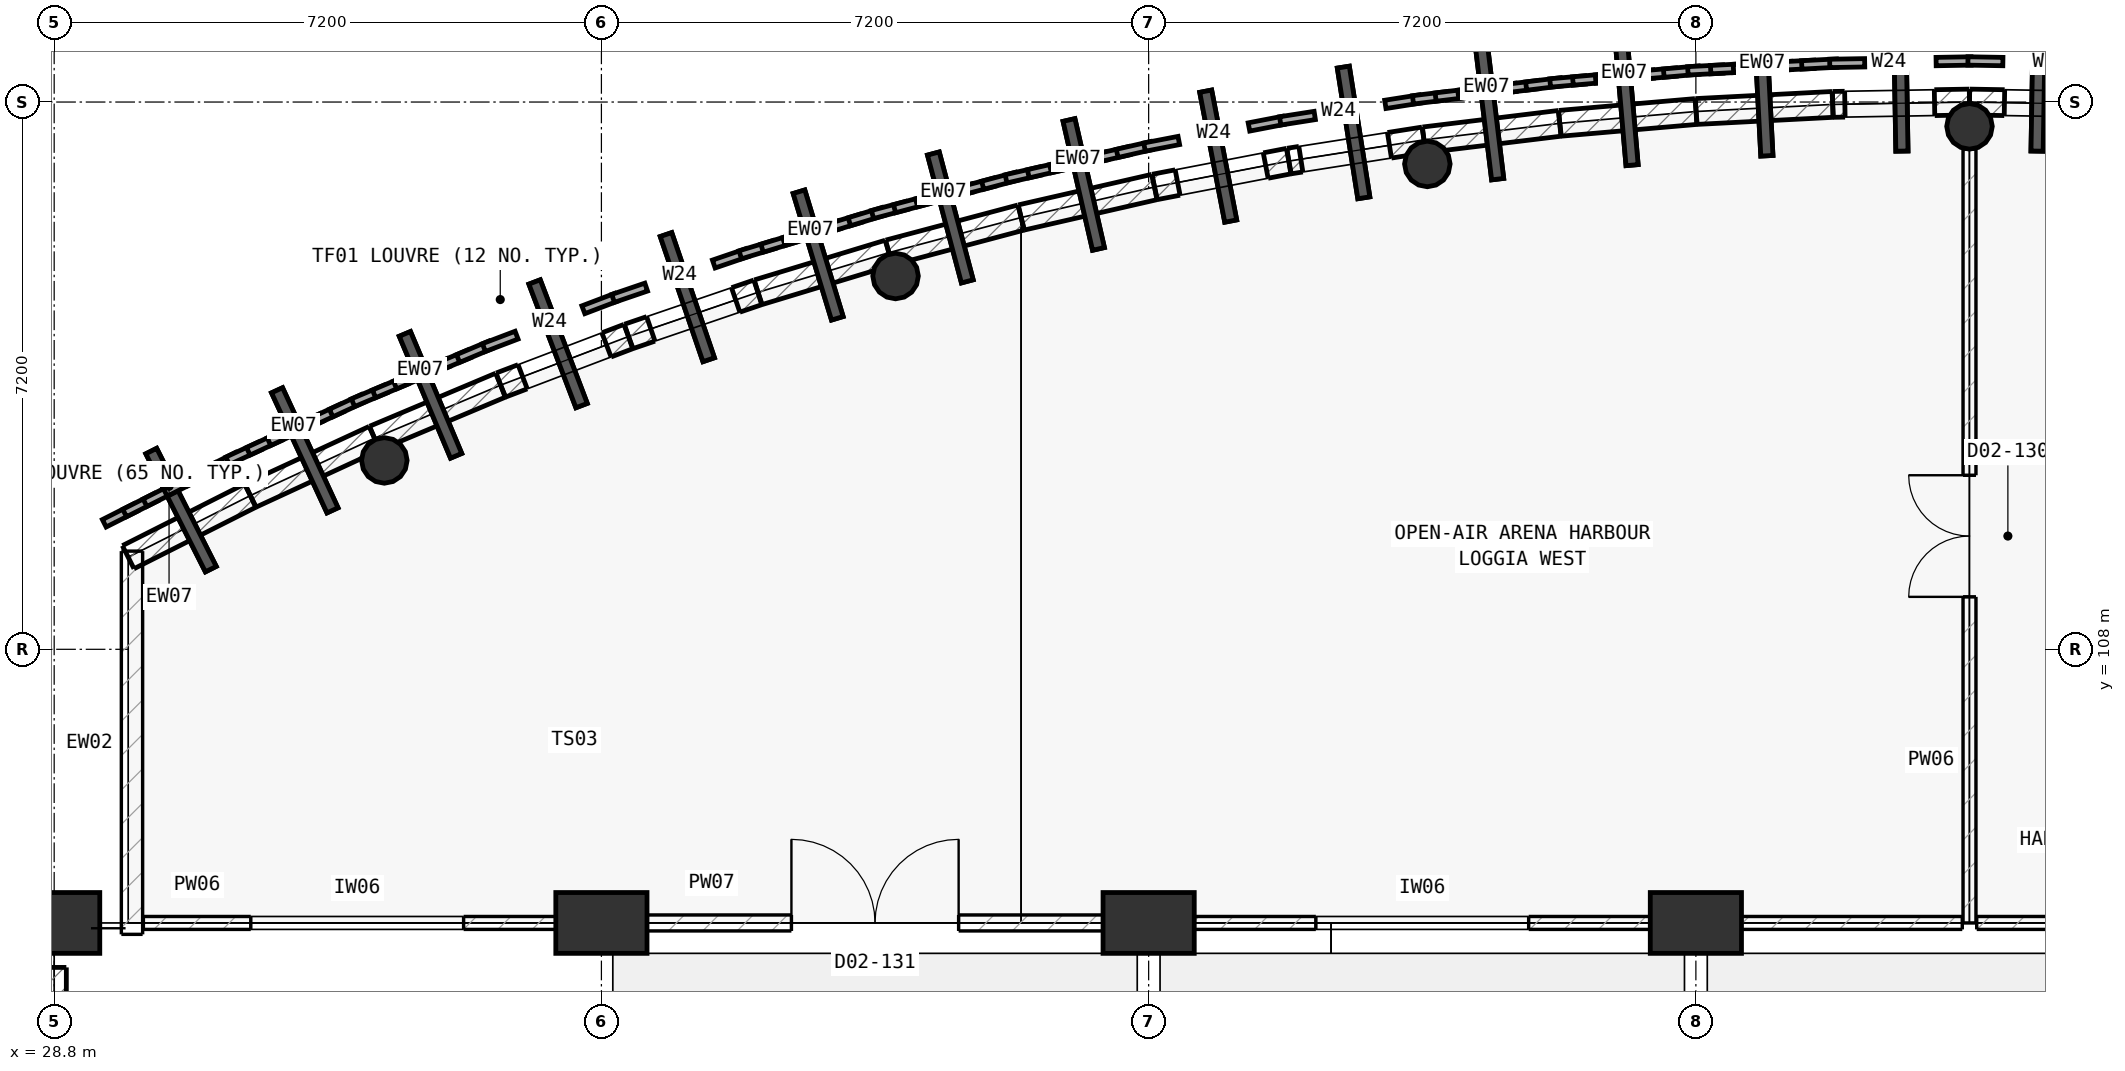
"""IFC4 building model, lengths in metres.
Left out: names, types, materials, properties, quantities, classifications, styles, units other than length and angle.
Written with IfcOpenShell. Run it as: python <this file> out.ifc"""

import sys

from ifc_helpers import new_model, si_unit, direction, frame, frame_2d, origin, origin_2d, place, context, subcontext, project, spatial, polyline, rectangle, circle, outline, extrude, element, fill, save


model = new_model("IFC4")
c1 = context("Model", 3, precision=1e-05, world=origin(), true_north=direction((0.0, 1.0)))
c2 = subcontext(c1, "Body", "Model", "MODEL_VIEW")
j1 = project(units=[si_unit("LENGTHUNIT", "METRE"), si_unit("PLANEANGLEUNIT", "RADIAN")], contexts=[c1])
p1 = place(None, origin())
s1 = spatial("IfcSite", under=j1, at=p1, CompositionType="ELEMENT")
p2 = place(p1, origin())
s2 = spatial("IfcBuilding", under=s1, at=p2, CompositionType="ELEMENT")
p3 = place(p2, frame((0.0, 0.0, 11.2)))
s3 = spatial("IfcBuildingStorey", under=s2, at=p3, CompositionType="ELEMENT", Elevation=11.2)
p4 = place(p3, frame((28.8, 104.4, -0.8), z_axis=(0.0, 0.0, 1.0), x_axis=(1.0, 0.0, 0.0)))
e1 = element("IfcColumn", 1, at=p4, inside=s3, PredefinedType="COLUMN", context=c2, shape_type="SweptSolid", body=[
    extrude(rectangle(XDim=0.8, YDim=1.2, at=origin_2d()), origin(), (0.0, 0.0, 1.0), 5.6),
])
p5 = place(p3, frame((33.144, 110.485, 0.0), z_axis=(0.0, 0.0, 1.0), x_axis=(1.0, 0.0, 0.0)))
e2 = element("IfcColumn", 2, at=p5, inside=s3, PredefinedType="COLUMN", context=c2, shape_type="SweptSolid", body=[
    extrude(circle(Radius=0.3, at=origin_2d()), origin(), (0.0, 0.0, 1.0), 4.8),
])
p6 = place(p3, frame((36.0, 104.4, -0.8), z_axis=(0.0, 0.0, 1.0), x_axis=(1.0, 0.0, 0.0)))
e3 = element("IfcColumn", 3, at=p6, inside=s3, PredefinedType="COLUMN", context=c2, shape_type="SweptSolid", body=[
    extrude(rectangle(XDim=0.8, YDim=1.2, at=origin_2d()), origin(), (0.0, 0.0, 1.0), 5.6),
])
p7 = place(p3, frame((39.87, 112.911, 0.0), z_axis=(0.0, 0.0, 1.0), x_axis=(1.0, 0.0, 0.0)))
e4 = element("IfcColumn", 4, at=p7, inside=s3, PredefinedType="COLUMN", context=c2, shape_type="SweptSolid", body=[
    extrude(circle(Radius=0.3, at=origin_2d()), origin(), (0.0, 0.0, 1.0), 4.8),
])
p8 = place(p3, frame((43.2, 104.4, -0.8), z_axis=(0.0, 0.0, 1.0), x_axis=(1.0, 0.0, 0.0)))
e5 = element("IfcColumn", 5, at=p8, inside=s3, PredefinedType="COLUMN", context=c2, shape_type="SweptSolid", body=[
    extrude(rectangle(XDim=0.8, YDim=1.2, at=origin_2d()), origin(), (0.0, 0.0, 1.0), 5.6),
])
p9 = place(p3, frame((46.867, 114.385, 0.0), z_axis=(0.0, 0.0, 1.0), x_axis=(1.0, 0.0, 0.0)))
e6 = element("IfcColumn", 6, at=p9, inside=s3, PredefinedType="COLUMN", context=c2, shape_type="SweptSolid", body=[
    extrude(circle(Radius=0.3, at=origin_2d()), origin(), (0.0, 0.0, 1.0), 4.8),
])
p10 = place(p3, frame((50.4, 104.4, -0.8), z_axis=(0.0, 0.0, 1.0), x_axis=(1.0, 0.0, 0.0)))
e7 = element("IfcColumn", 7, at=p10, inside=s3, PredefinedType="COLUMN", context=c2, shape_type="SweptSolid", body=[
    extrude(rectangle(XDim=0.8, YDim=1.2, at=origin_2d()), origin(), (0.0, 0.0, 1.0), 5.6),
])
p11 = place(p3, frame((54.0, 114.88, 0.0), z_axis=(0.0, 0.0, 1.0), x_axis=(1.0, 0.0, 0.0)))
e8 = element("IfcColumn", 8, at=p11, inside=s3, PredefinedType="COLUMN", context=c2, shape_type="SweptSolid", body=[
    extrude(circle(Radius=0.3, at=origin_2d()), origin(), (0.0, 0.0, 1.0), 4.8),
])
for number, where, z_axis, x_axis in (
    (9, (29.774, 109.212, 0.0), (0.0, 0.0, 1.0), (0.893, 0.45, 0.0)),
    (10, (31.381, 110.023, 0.0), (0.0, 0.0, 1.0), (0.908, 0.419, 0.0)),
):
    element("IfcWall", number, at=place(p3, frame(where, z_axis=z_axis, x_axis=x_axis)), inside=s3, PredefinedType="SOLIDWALL", context=c2, shape_type="SweptSolid", body=[
        extrude(outline(polyline([(0.003, -0.17), (1.797, -0.17), (1.803, 0.17), (-0.003, 0.17), (0.003, -0.17)])), origin(), (0.0, 0.0, 1.0), 4.8),
    ])
p12 = place(p3, frame((33.015, 110.778, 0.0), z_axis=(0.0, 0.0, 1.0), x_axis=(0.921803799964, 0.387656748131, 0.0)))
e11 = element("IfcWall", 11, at=p12, inside=s3, PredefinedType="SOLIDWALL", context=c2, shape_type="SweptSolid", body=[
    extrude(outline(polyline([(0.003, -0.17), (1.797, -0.17), (1.803, 0.17), (-0.003, 0.17), (0.003, -0.17)])), origin(), (0.0, 0.0, 1.0), 4.8),
])
p13 = place(p3, frame((34.674, 111.475, 0.0), z_axis=(0.0, 0.0, 1.0), x_axis=(0.934674543416, 0.35550456803, 0.0)))
e12 = element("IfcWall", 12, at=p13, inside=s3, PredefinedType="SOLIDWALL", context=c2, shape_type="SweptSolid", body=[
    extrude(outline(polyline([(0.003, -0.17), (1.797, -0.17), (1.803, 0.17), (-0.003, 0.17), (0.003, -0.17)])), origin(), (0.0, 0.0, 1.0), 4.8),
])
p14 = place(p13, frame((0.31, 0.0, 0.55)))
e13 = element("IfcOpeningElement", 13, at=p14, cuts=e12, PredefinedType="OPENING", context=c2, shape_type="SweptSolid", body=[
    extrude(rectangle(XDim=1.18, YDim=3.4, at=frame_2d((0.59, 1.7))), frame((0.0, 0.18, 0.0), z_axis=(0.0, -1.0, 0.0), x_axis=(1.0, 0.0, 0.0)), (0.0, 0.0, 1.0), 0.36),
])
p15 = place(p3, frame((36.356, 112.115, 0.0), z_axis=(0.0, 0.0, 1.0), x_axis=(0.946421657721, 0.322933500578, 0.0)))
e14 = element("IfcWall", 14, at=p15, inside=s3, PredefinedType="SOLIDWALL", context=c2, shape_type="SweptSolid", body=[
    extrude(outline(polyline([(0.003, -0.17), (1.797, -0.17), (1.803, 0.17), (-0.003, 0.17), (0.003, -0.17)])), origin(), (0.0, 0.0, 1.0), 4.8),
])
p16 = place(p15, frame((0.31, 0.0, 0.55)))
e15 = element("IfcOpeningElement", 15, at=p16, cuts=e14, PredefinedType="OPENING", context=c2, shape_type="SweptSolid", body=[
    extrude(rectangle(XDim=1.18, YDim=3.4, at=frame_2d((0.59, 1.7))), frame((0.0, 0.18, 0.0), z_axis=(0.0, -1.0, 0.0), x_axis=(1.0, 0.0, 0.0)), (0.0, 0.0, 1.0), 0.36),
])
p17 = place(p3, frame((38.06, 112.697, 0.0), z_axis=(0.0, 0.0, 1.0), x_axis=(0.956993600338, 0.290109029354, 0.0)))
e16 = element("IfcWall", 16, at=p17, inside=s3, PredefinedType="SOLIDWALL", context=c2, shape_type="SweptSolid", body=[
    extrude(outline(polyline([(0.003, -0.17), (1.797, -0.17), (1.803, 0.17), (-0.003, 0.17), (0.003, -0.17)])), origin(), (0.0, 0.0, 1.0), 4.8),
])
p18 = place(p3, frame((39.783, 113.219, 0.0), z_axis=(0.0, 0.0, 1.0), x_axis=(0.966504582235, 0.256649357135, 0.0)))
e17 = element("IfcWall", 17, at=p18, inside=s3, PredefinedType="SOLIDWALL", context=c2, shape_type="SweptSolid", body=[
    extrude(outline(polyline([(0.003, -0.17), (1.797, -0.17), (1.803, 0.17), (-0.003, 0.17), (0.003, -0.17)])), origin(), (0.0, 0.0, 1.0), 4.8),
])
p19 = place(p3, frame((41.522, 113.681, 0.0), z_axis=(0.0, 0.0, 1.0), x_axis=(0.974791962114, 0.223115733641, 0.0)))
e18 = element("IfcWall", 18, at=p19, inside=s3, PredefinedType="SOLIDWALL", context=c2, shape_type="SweptSolid", body=[
    extrude(outline(polyline([(0.003, -0.17), (1.797, -0.17), (1.803, 0.17), (-0.003, 0.17), (0.003, -0.17)])), origin(), (0.0, 0.0, 1.0), 4.8),
])
p20 = place(p3, frame((43.277, 114.082, 0.0), z_axis=(0.0, 0.0, 1.0), x_axis=(0.981913462005, 0.189330275271, 0.0)))
e19 = element("IfcWall", 19, at=p20, inside=s3, PredefinedType="SOLIDWALL", context=c2, shape_type="SweptSolid", body=[
    extrude(outline(polyline([(0.003, -0.17), (1.797, -0.17), (1.803, 0.17), (-0.003, 0.17), (0.003, -0.17)])), origin(), (0.0, 0.0, 1.0), 4.8),
])
p21 = place(p20, frame((0.31, 0.0, 0.55)))
e20 = element("IfcOpeningElement", 20, at=p21, cuts=e19, PredefinedType="OPENING", context=c2, shape_type="SweptSolid", body=[
    extrude(rectangle(XDim=1.18, YDim=3.4, at=frame_2d((0.59, 1.7))), frame((0.0, 0.18, 0.0), z_axis=(0.0, -1.0, 0.0), x_axis=(1.0, 0.0, 0.0)), (0.0, 0.0, 1.0), 0.36),
])
p22 = place(p3, frame((45.044, 114.423, 0.0), z_axis=(0.0, 0.0, 1.0), x_axis=(0.987886929918, 0.155175428783, 0.0)))
e21 = element("IfcWall", 21, at=p22, inside=s3, PredefinedType="SOLIDWALL", context=c2, shape_type="SweptSolid", body=[
    extrude(outline(polyline([(0.003, -0.17), (1.797, -0.17), (1.803, 0.17), (-0.003, 0.17), (0.003, -0.17)])), origin(), (0.0, 0.0, 1.0), 4.8),
])
p23 = place(p22, frame((0.16, 0.0, 0.55)))
e22 = element("IfcOpeningElement", 22, at=p23, cuts=e21, PredefinedType="OPENING", context=c2, shape_type="SweptSolid", body=[
    extrude(rectangle(XDim=1.18, YDim=3.4, at=frame_2d((0.59, 1.7))), frame((0.0, 0.18, 0.0), z_axis=(0.0, -1.0, 0.0), x_axis=(1.0, 0.0, 0.0)), (0.0, 0.0, 1.0), 0.36),
])
p24 = place(p3, frame((46.823, 114.702, 0.0), z_axis=(0.0, 0.0, 1.0), x_axis=(0.992671296073, 0.120845761006, 0.0)))
e23 = element("IfcWall", 23, at=p24, inside=s3, PredefinedType="SOLIDWALL", context=c2, shape_type="SweptSolid", body=[
    extrude(outline(polyline([(0.003, -0.17), (1.797, -0.17), (1.803, 0.17), (-0.003, 0.17), (0.003, -0.17)])), origin(), (0.0, 0.0, 1.0), 4.8),
])
p25 = place(p3, frame((48.609, 114.92, 0.0), z_axis=(0.0, 0.0, 1.0), x_axis=(0.996260411494, 0.086401345422, 0.0)))
e24 = element("IfcWall", 24, at=p25, inside=s3, PredefinedType="SOLIDWALL", context=c2, shape_type="SweptSolid", body=[
    extrude(outline(polyline([(0.003, -0.17), (1.797, -0.17), (1.803, 0.17), (-0.003, 0.17), (0.003, -0.17)])), origin(), (0.0, 0.0, 1.0), 4.8),
])
p26 = place(p3, frame((50.403, 115.075, 0.0), z_axis=(0.0, 0.0, 1.0), x_axis=(0.998649863362, 0.051946611119, 0.0)))
e25 = element("IfcWall", 25, at=p26, inside=s3, PredefinedType="SOLIDWALL", context=c2, shape_type="SweptSolid", body=[
    extrude(outline(polyline([(0.003, -0.17), (1.797, -0.17), (1.803, 0.17), (-0.003, 0.17), (0.003, -0.17)])), origin(), (0.0, 0.0, 1.0), 4.8),
])
p27 = place(p3, frame((52.2, 115.169, 0.0), z_axis=(0.0, 0.0, 1.0), x_axis=(0.999851642284, 0.017224790907, 0.0)))
e26 = element("IfcWall", 26, at=p27, inside=s3, PredefinedType="SOLIDWALL", context=c2, shape_type="SweptSolid", body=[
    extrude(outline(polyline([(0.003, -0.17), (1.797, -0.17), (1.803, 0.17), (-0.003, 0.17), (0.003, -0.17)])), origin(), (0.0, 0.0, 1.0), 4.8),
])
p28 = place(p27, frame((0.16, 0.0, 0.55)))
e27 = element("IfcOpeningElement", 27, at=p28, cuts=e26, PredefinedType="OPENING", context=c2, shape_type="SweptSolid", body=[
    extrude(rectangle(XDim=1.18, YDim=3.4, at=frame_2d((0.59, 1.7))), frame((0.0, 0.18, 0.0), z_axis=(0.0, -1.0, 0.0), x_axis=(1.0, 0.0, 0.0)), (0.0, 0.0, 1.0), 0.36),
])
p29 = place(p3, frame((54.0, 115.2, 0.0), z_axis=(0.0, 0.0, 1.0), x_axis=(0.999851642284, -0.017224790907, 0.0)))
e28 = element("IfcWall", 28, at=p29, inside=s3, PredefinedType="SOLIDWALL", context=c2, shape_type="SweptSolid", body=[
    extrude(outline(polyline([(0.003, -0.17), (1.797, -0.17), (1.803, 0.17), (-0.003, 0.17), (0.003, -0.17)])), origin(), (0.0, 0.0, 1.0), 4.8),
])
p30 = place(p29, frame((0.46, 0.0, 0.55)))
e29 = element("IfcOpeningElement", 29, at=p30, cuts=e28, PredefinedType="OPENING", context=c2, shape_type="SweptSolid", body=[
    extrude(rectangle(XDim=1.18, YDim=3.4, at=frame_2d((0.59, 1.7))), frame((0.0, 0.18, 0.0), z_axis=(0.0, -1.0, 0.0), x_axis=(1.0, 0.0, 0.0)), (0.0, 0.0, 1.0), 0.36),
])
p31 = place(p3, frame((29.824, 104.25, 0.0), z_axis=(0.0, 0.0, 1.0), x_axis=(0.0, 1.0, 0.0)))
e30 = element("IfcWall", 30, at=p31, inside=s3, PredefinedType="SOLIDWALL", context=c2, shape_type="SweptSolid", body=[
    extrude(rectangle(XDim=5.042, YDim=0.28, at=frame_2d((2.521, 0.0))), origin(), (0.0, 0.0, 1.0), 4.49),
])
p32 = place(p3, frame((28.8, 94.035, 0.0), z_axis=(0.0, 0.0, 1.0), x_axis=(0.0, 1.0, 0.0)))
e31 = element("IfcWall", 31, at=p32, inside=s3, PredefinedType="SOLIDWALL", context=c2, shape_type="SweptSolid", body=[
    extrude(rectangle(XDim=9.78, YDim=0.32, at=frame_2d((4.89, 0.0))), origin(), (0.0, 0.0, 1.0), 4.8),
])
p33 = place(p32, frame((3.29, 0.0, 2.15)))
e32 = element("IfcOpeningElement", 32, at=p33, cuts=e31, PredefinedType="OPENING", context=c2, shape_type="SweptSolid", body=[
    extrude(rectangle(XDim=3.2, YDim=1.2, at=frame_2d((1.6, 0.6))), frame((0.0, 0.17, 0.0), z_axis=(0.0, -1.0, 0.0), x_axis=(1.0, 0.0, 0.0)), (0.0, 0.0, 1.0), 0.34),
])
p34 = place(p3, frame((54.0, 104.4, 0.0), z_axis=(0.0, 0.0, 1.0), x_axis=(0.0, 1.0, 0.0)))
e33 = element("IfcWall", 33, at=p34, inside=s3, PredefinedType="PARTITIONING", context=c2, shape_type="SweptSolid", body=[
    extrude(rectangle(XDim=10.18, YDim=0.17, at=frame_2d((5.09, 0.0))), origin(), (0.0, 0.0, 1.0), 4.49),
])
p35 = place(p34, frame((4.29, 0.0, 0.0)))
e34 = element("IfcOpeningElement", 34, at=p35, cuts=e33, PredefinedType="OPENING", context=c2, shape_type="SweptSolid", body=[
    extrude(rectangle(XDim=1.6, YDim=2.2, at=frame_2d((0.8, 1.1))), frame((0.0, 0.095, 0.0), z_axis=(0.0, -1.0, 0.0), x_axis=(1.0, 0.0, 0.0)), (0.0, 0.0, 1.0), 0.19),
])
p36 = place(p3, frame((29.974, 104.4, 0.0), z_axis=(0.0, 0.0, 1.0), x_axis=(1.0, 0.0, 0.0)))
e35 = element("IfcWall", 35, at=p36, inside=s3, PredefinedType="PARTITIONING", context=c2, shape_type="SweptSolid", body=[
    extrude(rectangle(XDim=5.626, YDim=0.17, at=frame_2d((2.813, 0.0))), origin(), (0.0, 0.0, 1.0), 3.88),
])
p37 = place(p36, frame((1.413, 0.0, 0.95)))
e36 = element("IfcOpeningElement", 36, at=p37, cuts=e35, PredefinedType="OPENING", context=c2, shape_type="SweptSolid", body=[
    extrude(rectangle(XDim=2.8, YDim=1.9, at=frame_2d((1.4, 0.95))), frame((0.0, 0.095, 0.0), z_axis=(0.0, -1.0, 0.0), x_axis=(1.0, 0.0, 0.0)), (0.0, 0.0, 1.0), 0.19),
])
p38 = place(p3, frame((36.4, 104.4, 0.0), z_axis=(0.0, 0.0, 1.0), x_axis=(1.0, 0.0, 0.0)))
e37 = element("IfcWall", 37, at=p38, inside=s3, PredefinedType="PARTITIONING", context=c2, shape_type="SweptSolid", body=[
    extrude(rectangle(XDim=6.4, YDim=0.21, at=frame_2d((3.2, 0.0))), origin(), (0.0, 0.0, 1.0), 3.88),
])
p39 = place(p38, frame((2.1, 0.0, 0.0)))
e38 = element("IfcOpeningElement", 38, at=p39, cuts=e37, PredefinedType="OPENING", context=c2, shape_type="SweptSolid", body=[
    extrude(rectangle(XDim=2.2, YDim=2.5, at=frame_2d((1.1, 1.25))), frame((0.0, 0.115, 0.0), z_axis=(0.0, -1.0, 0.0), x_axis=(1.0, 0.0, 0.0)), (0.0, 0.0, 1.0), 0.23),
])
p40 = place(p3, frame((43.6, 104.4, 0.0), z_axis=(0.0, 0.0, 1.0), x_axis=(1.0, 0.0, 0.0)))
e39 = element("IfcWall", 39, at=p40, inside=s3, PredefinedType="PARTITIONING", context=c2, shape_type="SweptSolid", body=[
    extrude(rectangle(XDim=6.4, YDim=0.17, at=frame_2d((3.2, 0.0))), origin(), (0.0, 0.0, 1.0), 3.88),
])
p41 = place(p40, frame((1.8, 0.0, 0.95)))
e40 = element("IfcOpeningElement", 40, at=p41, cuts=e39, PredefinedType="OPENING", context=c2, shape_type="SweptSolid", body=[
    extrude(rectangle(XDim=2.8, YDim=1.9, at=frame_2d((1.4, 0.95))), frame((0.0, 0.095, 0.0), z_axis=(0.0, -1.0, 0.0), x_axis=(1.0, 0.0, 0.0)), (0.0, 0.0, 1.0), 0.19),
])
for number, where, z_axis, x_axis in (
    (41, (50.8, 104.4, 0.0), (0.0, 0.0, 1.0), (1.0, 0.0, 0.0)),
    (42, (54.095, 104.4, 0.0), (0.0, 0.0, 1.0), (1.0, 0.0, 0.0)),
):
    element("IfcWall", number, at=place(p3, frame(where, z_axis=z_axis, x_axis=x_axis)), inside=s3, PredefinedType="PARTITIONING", context=c2, shape_type="SweptSolid", body=[
        extrude(rectangle(XDim=3.105, YDim=0.17, at=frame_2d((1.552, 0.0))), origin(), (0.0, 0.0, 1.0), 3.88),
    ])
p42 = place(p14, origin())
e43 = element("IfcWindow", 43, at=p42, inside=s3, PartitioningType="SINGLE_PANEL", PredefinedType="WINDOW", context=c2, shape_type="SweptSolid", body=[
    extrude(rectangle(XDim=1.18, YDim=3.4, at=frame_2d((0.59, 1.7))), frame((0.0, 0.03, 0.0), z_axis=(0.0, -1.0, 0.0), x_axis=(1.0, 0.0, 0.0)), (0.0, 0.0, 1.0), 0.06),
])
fill(e13, e43)
p43 = place(p16, origin())
e44 = element("IfcWindow", 44, at=p43, inside=s3, PartitioningType="SINGLE_PANEL", PredefinedType="WINDOW", context=c2, shape_type="SweptSolid", body=[
    extrude(rectangle(XDim=1.18, YDim=3.4, at=frame_2d((0.59, 1.7))), frame((0.0, 0.03, 0.0), z_axis=(0.0, -1.0, 0.0), x_axis=(1.0, 0.0, 0.0)), (0.0, 0.0, 1.0), 0.06),
])
fill(e15, e44)
p44 = place(p21, origin())
e45 = element("IfcWindow", 45, at=p44, inside=s3, PartitioningType="SINGLE_PANEL", PredefinedType="WINDOW", context=c2, shape_type="SweptSolid", body=[
    extrude(rectangle(XDim=1.18, YDim=3.4, at=frame_2d((0.59, 1.7))), frame((0.0, 0.03, 0.0), z_axis=(0.0, -1.0, 0.0), x_axis=(1.0, 0.0, 0.0)), (0.0, 0.0, 1.0), 0.06),
])
fill(e20, e45)
p45 = place(p23, origin())
e46 = element("IfcWindow", 46, at=p45, inside=s3, PartitioningType="SINGLE_PANEL", PredefinedType="WINDOW", context=c2, shape_type="SweptSolid", body=[
    extrude(rectangle(XDim=1.18, YDim=3.4, at=frame_2d((0.59, 1.7))), frame((0.0, 0.03, 0.0), z_axis=(0.0, -1.0, 0.0), x_axis=(1.0, 0.0, 0.0)), (0.0, 0.0, 1.0), 0.06),
])
fill(e22, e46)
p46 = place(p28, origin())
e47 = element("IfcWindow", 47, at=p46, inside=s3, PartitioningType="SINGLE_PANEL", PredefinedType="WINDOW", context=c2, shape_type="SweptSolid", body=[
    extrude(rectangle(XDim=1.18, YDim=3.4, at=frame_2d((0.59, 1.7))), frame((0.0, 0.03, 0.0), z_axis=(0.0, -1.0, 0.0), x_axis=(1.0, 0.0, 0.0)), (0.0, 0.0, 1.0), 0.06),
])
fill(e27, e47)
p47 = place(p30, origin())
e48 = element("IfcWindow", 48, at=p47, inside=s3, PartitioningType="SINGLE_PANEL", PredefinedType="WINDOW", context=c2, shape_type="SweptSolid", body=[
    extrude(rectangle(XDim=1.18, YDim=3.4, at=frame_2d((0.59, 1.7))), frame((0.0, 0.03, 0.0), z_axis=(0.0, -1.0, 0.0), x_axis=(1.0, 0.0, 0.0)), (0.0, 0.0, 1.0), 0.06),
])
fill(e29, e48)
p48 = place(p35, origin())
e49 = element("IfcDoor", 49, at=p48, inside=s3, OperationType="DOUBLE_DOOR_SINGLE_SWING", PredefinedType="DOOR", context=c2, shape_type="SweptSolid", body=[
    extrude(rectangle(XDim=1.6, YDim=2.2, at=frame_2d((0.8, 1.1))), frame((0.0, 0.025, 0.0), z_axis=(0.0, -1.0, 0.0), x_axis=(1.0, 0.0, 0.0)), (0.0, 0.0, 1.0), 0.05),
])
fill(e34, e49)
p49 = place(p37, origin())
e50 = element("IfcWindow", 50, at=p49, inside=s3, PartitioningType="SINGLE_PANEL", PredefinedType="WINDOW", context=c2, shape_type="SweptSolid", body=[
    extrude(rectangle(XDim=2.8, YDim=1.9, at=frame_2d((1.4, 0.95))), frame((0.0, 0.03, 0.0), z_axis=(0.0, -1.0, 0.0), x_axis=(1.0, 0.0, 0.0)), (0.0, 0.0, 1.0), 0.06),
])
fill(e36, e50)
p50 = place(p39, origin())
e51 = element("IfcDoor", 51, at=p50, inside=s3, OperationType="DOUBLE_DOOR_SINGLE_SWING", PredefinedType="DOOR", context=c2, shape_type="SweptSolid", body=[
    extrude(rectangle(XDim=2.2, YDim=2.5, at=frame_2d((1.1, 1.25))), frame((0.0, 0.025, 0.0), z_axis=(0.0, -1.0, 0.0), x_axis=(1.0, 0.0, 0.0)), (0.0, 0.0, 1.0), 0.05),
])
fill(e38, e51)
p51 = place(p41, origin())
e52 = element("IfcWindow", 52, at=p51, inside=s3, PartitioningType="SINGLE_PANEL", PredefinedType="WINDOW", context=c2, shape_type="SweptSolid", body=[
    extrude(rectangle(XDim=2.8, YDim=1.9, at=frame_2d((1.4, 0.95))), frame((0.0, 0.03, 0.0), z_axis=(0.0, -1.0, 0.0), x_axis=(1.0, 0.0, 0.0)), (0.0, 0.0, 1.0), 0.06),
])
fill(e40, e52)
save(model, sys.argv[1])
